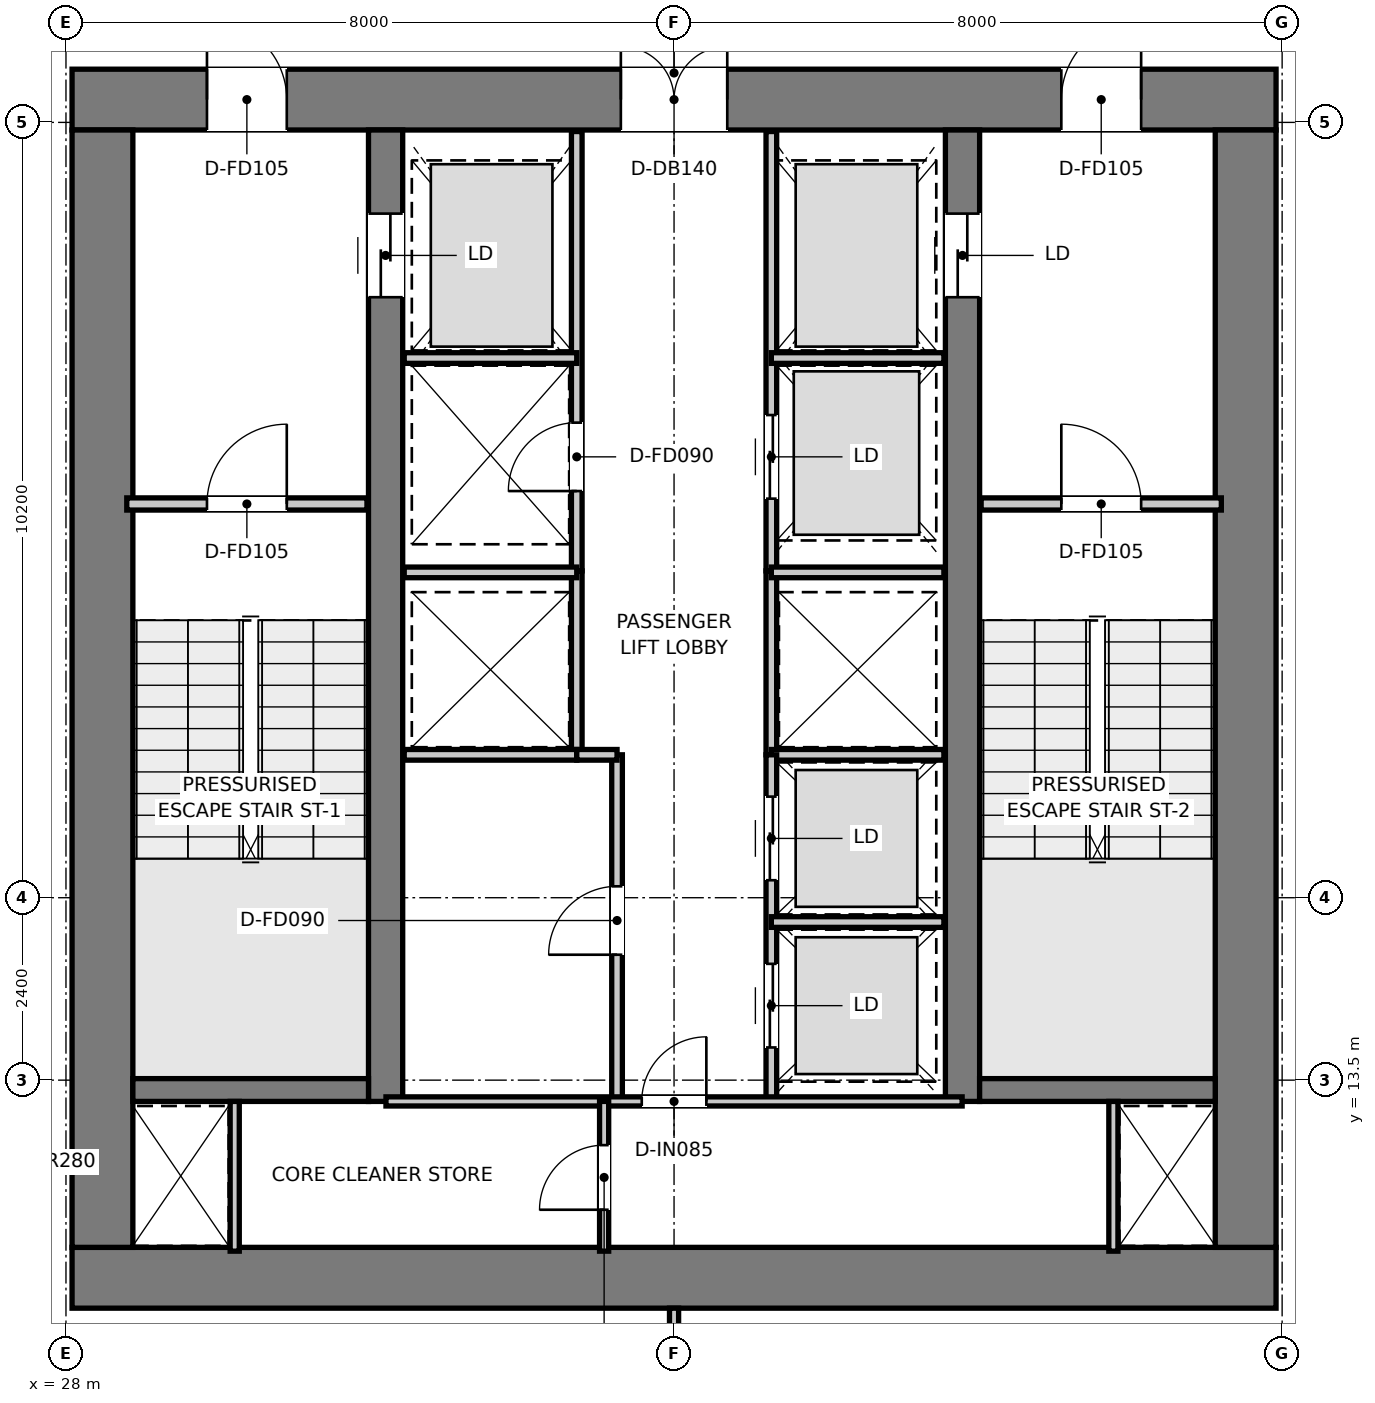
"""IFC4 building model, lengths in metres.
Left out: names, types, materials, properties, quantities, classifications, styles, units other than length and angle.
Written with IfcOpenShell. Run it as: python <this file> out.ifc"""

import sys

from ifc_helpers import new_model, si_unit, direction, frame, frame_2d, origin, place, context, subcontext, project, spatial, rectangle, extrude, element, fill, save


model = new_model("IFC4")
c1 = context("Model", 3, precision=1e-05, world=origin(), true_north=direction((0.0, 1.0)))
c2 = subcontext(c1, "Body", "Model", "MODEL_VIEW")
j1 = project(units=[si_unit("LENGTHUNIT", "METRE"), si_unit("PLANEANGLEUNIT", "RADIAN")], contexts=[c1])
p1 = place(None, origin())
s1 = spatial("IfcSite", under=j1, at=p1, CompositionType="ELEMENT")
p2 = place(p1, origin())
s2 = spatial("IfcBuilding", under=s1, at=p2, CompositionType="ELEMENT")
p3 = place(p2, frame((0.0, 0.0, 162.0)))
s3 = spatial("IfcBuildingStorey", under=s2, at=p3, CompositionType="ELEMENT", Elevation=162.0)
p4 = place(p3, frame((28.08, 10.9, 0.0), z_axis=(0.0, 0.0, 1.0), x_axis=(1.0, 0.0, 0.0)))
e1 = element("IfcWall", 1, at=p4, inside=s3, PredefinedType="SHEAR", context=c2, shape_type="SweptSolid", body=[
    extrude(rectangle(XDim=15.84, YDim=0.8, at=frame_2d((7.92, 0.0))), origin(), (0.0, 0.0, 1.0), 3.95),
])
p5 = place(p3, frame((28.08, 26.4, 0.0), z_axis=(0.0, 0.0, 1.0), x_axis=(1.0, 0.0, 0.0)))
e2 = element("IfcWall", 2, at=p5, inside=s3, PredefinedType="SHEAR", context=c2, shape_type="SweptSolid", body=[
    extrude(rectangle(XDim=15.84, YDim=0.8, at=frame_2d((7.92, 0.0))), origin(), (0.0, 0.0, 1.0), 3.95),
])
p6 = place(p5, frame((7.22, 0.0, 0.0)))
e3 = element("IfcOpeningElement", 3, at=p6, cuts=e2, PredefinedType="OPENING", context=c2, shape_type="SweptSolid", body=[
    extrude(rectangle(XDim=1.4, YDim=2.2, at=frame_2d((0.7, 1.1))), frame((0.0, 0.41, 0.0), z_axis=(0.0, -1.0, 0.0), x_axis=(1.0, 0.0, 0.0)), (0.0, 0.0, 1.0), 0.82),
])
p7 = place(p5, frame((1.775, 0.0, 0.0)))
e4 = element("IfcOpeningElement", 4, at=p7, cuts=e2, PredefinedType="OPENING", context=c2, shape_type="SweptSolid", body=[
    extrude(rectangle(XDim=1.05, YDim=2.1, at=frame_2d((0.525, 1.05))), frame((0.0, 0.41, 0.0), z_axis=(0.0, -1.0, 0.0), x_axis=(1.0, 0.0, 0.0)), (0.0, 0.0, 1.0), 0.82),
])
p8 = place(p5, frame((13.015, 0.0, 0.0)))
e5 = element("IfcOpeningElement", 5, at=p8, cuts=e2, PredefinedType="OPENING", context=c2, shape_type="SweptSolid", body=[
    extrude(rectangle(XDim=1.05, YDim=2.1, at=frame_2d((0.525, 1.05))), frame((0.0, 0.41, 0.0), z_axis=(0.0, -1.0, 0.0), x_axis=(1.0, 0.0, 0.0)), (0.0, 0.0, 1.0), 0.82),
])
for number, where, z_axis, x_axis in (
    (6, (28.48, 11.3, 0.0), (0.0, 0.0, 1.0), (0.0, 1.0, 0.0)),
    (7, (43.52, 11.3, 0.0), (0.0, 0.0, 1.0), (0.0, 1.0, 0.0)),
):
    element("IfcWall", number, at=place(p3, frame(where, z_axis=z_axis, x_axis=x_axis)), inside=s3, PredefinedType="SHEAR", context=c2, shape_type="SweptSolid", body=[
        extrude(rectangle(XDim=14.7, YDim=0.8, at=frame_2d((7.35, 0.0))), origin(), (0.0, 0.0, 1.0), 3.95),
    ])
p9 = place(p3, frame((32.205, 13.22, 0.0), z_axis=(0.0, 0.0, 1.0), x_axis=(0.0, 1.0, 0.0)))
e8 = element("IfcWall", 8, at=p9, inside=s3, PredefinedType="SHEAR", context=c2, shape_type="SweptSolid", body=[
    extrude(rectangle(XDim=12.78, YDim=0.45, at=frame_2d((6.39, 0.0))), origin(), (0.0, 0.0, 1.0), 3.95),
])
p10 = place(p9, frame((10.58, 0.0, 0.0)))
e9 = element("IfcOpeningElement", 9, at=p10, cuts=e8, PredefinedType="OPENING", context=c2, shape_type="SweptSolid", body=[
    extrude(rectangle(XDim=1.1, YDim=2.15, at=frame_2d((0.55, 1.075))), frame((0.0, 0.235, 0.0), z_axis=(0.0, -1.0, 0.0), x_axis=(1.0, 0.0, 0.0)), (0.0, 0.0, 1.0), 0.47),
])
p11 = place(p3, frame((39.795, 13.22, 0.0), z_axis=(0.0, 0.0, 1.0), x_axis=(0.0, 1.0, 0.0)))
e10 = element("IfcWall", 10, at=p11, inside=s3, PredefinedType="SHEAR", context=c2, shape_type="SweptSolid", body=[
    extrude(rectangle(XDim=12.78, YDim=0.45, at=frame_2d((6.39, 0.0))), origin(), (0.0, 0.0, 1.0), 3.95),
])
p12 = place(p11, frame((10.58, 0.0, 0.0)))
e11 = element("IfcOpeningElement", 11, at=p12, cuts=e10, PredefinedType="OPENING", context=c2, shape_type="SweptSolid", body=[
    extrude(rectangle(XDim=1.1, YDim=2.15, at=frame_2d((0.55, 1.075))), frame((0.0, 0.235, 0.0), z_axis=(0.0, -1.0, 0.0), x_axis=(1.0, 0.0, 0.0)), (0.0, 0.0, 1.0), 0.47),
])
for number, where, z_axis, x_axis in (
    (12, (28.88, 13.37, 0.0), (0.0, 0.0, 1.0), (1.0, 0.0, 0.0)),
    (13, (40.02, 13.37, 0.0), (0.0, 0.0, 1.0), (1.0, 0.0, 0.0)),
):
    element("IfcWall", number, at=place(p3, frame(where, z_axis=z_axis, x_axis=x_axis)), inside=s3, PredefinedType="SHEAR", context=c2, shape_type="SweptSolid", body=[
        extrude(rectangle(XDim=3.1, YDim=0.3, at=frame_2d((1.55, 0.0))), origin(), (0.0, 0.0, 1.0), 3.95),
    ])
p13 = place(p3, frame((28.8, 21.08, 0.0), z_axis=(0.0, 0.0, 1.0), x_axis=(1.0, 0.0, 0.0)))
e14 = element("IfcWall", 14, at=p13, inside=s3, PredefinedType="PARTITIONING", context=c2, shape_type="SweptSolid", body=[
    extrude(rectangle(XDim=3.16, YDim=0.16, at=frame_2d((1.58, 0.0))), origin(), (0.0, 0.0, 1.0), 3.67),
])
p14 = place(p13, frame((1.055, 0.0, 0.0)))
e15 = element("IfcOpeningElement", 15, at=p14, cuts=e14, PredefinedType="OPENING", context=c2, shape_type="SweptSolid", body=[
    extrude(rectangle(XDim=1.05, YDim=2.1, at=frame_2d((0.525, 1.05))), frame((0.0, 0.09, 0.0), z_axis=(0.0, -1.0, 0.0), x_axis=(1.0, 0.0, 0.0)), (0.0, 0.0, 1.0), 0.18),
])
p15 = place(p3, frame((40.04, 21.08, 0.0), z_axis=(0.0, 0.0, 1.0), x_axis=(1.0, 0.0, 0.0)))
e16 = element("IfcWall", 16, at=p15, inside=s3, PredefinedType="PARTITIONING", context=c2, shape_type="SweptSolid", body=[
    extrude(rectangle(XDim=3.16, YDim=0.16, at=frame_2d((1.58, 0.0))), origin(), (0.0, 0.0, 1.0), 3.67),
])
p16 = place(p15, frame((1.055, 0.0, 0.0)))
e17 = element("IfcOpeningElement", 17, at=p16, cuts=e16, PredefinedType="OPENING", context=c2, shape_type="SweptSolid", body=[
    extrude(rectangle(XDim=1.05, YDim=2.1, at=frame_2d((0.525, 1.05))), frame((0.0, 0.09, 0.0), z_axis=(0.0, -1.0, 0.0), x_axis=(1.0, 0.0, 0.0)), (0.0, 0.0, 1.0), 0.18),
])
p17 = place(p3, frame((34.72, 20.2, 0.0), z_axis=(0.0, 0.0, 1.0), x_axis=(0.0, 1.0, 0.0)))
e18 = element("IfcWall", 18, at=p17, inside=s3, PredefinedType="PARTITIONING", context=c2, shape_type="SweptSolid", body=[
    extrude(rectangle(XDim=5.78, YDim=0.14, at=frame_2d((2.89, 0.0))), origin(), (0.0, 0.0, 1.0), 2.67),
])
p18 = place(p17, frame((1.05, 0.0, 0.0)))
e19 = element("IfcOpeningElement", 19, at=p18, cuts=e18, PredefinedType="OPENING", context=c2, shape_type="SweptSolid", body=[
    extrude(rectangle(XDim=0.9, YDim=2.1, at=frame_2d((0.45, 1.05))), frame((0.0, 0.08, 0.0), z_axis=(0.0, -1.0, 0.0), x_axis=(1.0, 0.0, 0.0)), (0.0, 0.0, 1.0), 0.16),
])
p19 = place(p3, frame((37.28, 20.2, 0.0), z_axis=(0.0, 0.0, 1.0), x_axis=(0.0, 1.0, 0.0)))
e20 = element("IfcWall", 20, at=p19, inside=s3, PredefinedType="PARTITIONING", context=c2, shape_type="SweptSolid", body=[
    extrude(rectangle(XDim=5.78, YDim=0.14, at=frame_2d((2.89, 0.0))), origin(), (0.0, 0.0, 1.0), 2.67),
])
p20 = place(p19, frame((0.95, 0.0, 0.0)))
e21 = element("IfcOpeningElement", 21, at=p20, cuts=e20, PredefinedType="OPENING", context=c2, shape_type="SweptSolid", body=[
    extrude(rectangle(XDim=1.1, YDim=2.15, at=frame_2d((0.55, 1.075))), frame((0.0, 0.08, 0.0), z_axis=(0.0, -1.0, 0.0), x_axis=(1.0, 0.0, 0.0)), (0.0, 0.0, 1.0), 0.16),
])
for number, where, z_axis, x_axis in (
    (22, (32.45, 23.0, 0.0), (0.0, 0.0, 1.0), (1.0, 0.0, 0.0)),
    (23, (37.28, 23.0, 0.0), (0.0, 0.0, 1.0), (1.0, 0.0, 0.0)),
):
    element("IfcWall", number, at=place(p3, frame(where, z_axis=z_axis, x_axis=x_axis)), inside=s3, PredefinedType="PARTITIONING", context=c2, shape_type="SweptSolid", body=[
        extrude(rectangle(XDim=2.27, YDim=0.14, at=frame_2d((1.135, 0.0))), origin(), (0.0, 0.0, 1.0), 2.67),
    ])
for number, where, z_axis, x_axis in (
    (24, (34.72, 17.78, 0.0), (0.0, 0.0, 1.0), (0.0, 1.0, 0.0)),
    (25, (37.28, 17.78, 0.0), (0.0, 0.0, 1.0), (0.0, 1.0, 0.0)),
):
    element("IfcWall", number, at=place(p3, frame(where, z_axis=z_axis, x_axis=x_axis)), inside=s3, PredefinedType="PARTITIONING", context=c2, shape_type="SweptSolid", body=[
        extrude(rectangle(XDim=2.42, YDim=0.14, at=frame_2d((1.21, 0.0))), origin(), (0.0, 0.0, 1.0), 3.67),
    ])
for number, where, z_axis, x_axis in (
    (26, (32.45, 17.78, 0.0), (0.0, 0.0, 1.0), (1.0, 0.0, 0.0)),
    (27, (32.45, 20.18, 0.0), (0.0, 0.0, 1.0), (1.0, 0.0, 0.0)),
    (28, (37.28, 17.78, 0.0), (0.0, 0.0, 1.0), (1.0, 0.0, 0.0)),
    (29, (37.28, 20.18, 0.0), (0.0, 0.0, 1.0), (1.0, 0.0, 0.0)),
):
    element("IfcWall", number, at=place(p3, frame(where, z_axis=z_axis, x_axis=x_axis)), inside=s3, PredefinedType="PARTITIONING", context=c2, shape_type="SweptSolid", body=[
        extrude(rectangle(XDim=2.27, YDim=0.14, at=frame_2d((1.135, 0.0))), origin(), (0.0, 0.0, 1.0), 3.67),
    ])
p21 = place(p3, frame((35.25, 13.22, 0.0), z_axis=(0.0, 0.0, 1.0), x_axis=(0.0, 1.0, 0.0)))
e30 = element("IfcWall", 30, at=p21, inside=s3, PredefinedType="PARTITIONING", context=c2, shape_type="SweptSolid", body=[
    extrude(rectangle(XDim=4.56, YDim=0.14, at=frame_2d((2.28, 0.0))), origin(), (0.0, 0.0, 1.0), 3.67),
])
p22 = place(p21, frame((1.93, 0.0, 0.0)))
e31 = element("IfcOpeningElement", 31, at=p22, cuts=e30, PredefinedType="OPENING", context=c2, shape_type="SweptSolid", body=[
    extrude(rectangle(XDim=0.9, YDim=2.1, at=frame_2d((0.45, 1.05))), frame((0.0, 0.08, 0.0), z_axis=(0.0, -1.0, 0.0), x_axis=(1.0, 0.0, 0.0)), (0.0, 0.0, 1.0), 0.16),
])
p23 = place(p3, frame((34.72, 17.78, 0.0), z_axis=(0.0, 0.0, 1.0), x_axis=(1.0, 0.0, 0.0)))
e32 = element("IfcWall", 32, at=p23, inside=s3, PredefinedType="PARTITIONING", context=c2, shape_type="SweptSolid", body=[
    extrude(rectangle(XDim=0.53, YDim=0.14, at=frame_2d((0.265, 0.0))), origin(), (0.0, 0.0, 1.0), 3.67),
])
p24 = place(p3, frame((37.28, 13.22, 0.0), z_axis=(0.0, 0.0, 1.0), x_axis=(0.0, 1.0, 0.0)))
e33 = element("IfcWall", 33, at=p24, inside=s3, PredefinedType="PARTITIONING", context=c2, shape_type="SweptSolid", body=[
    extrude(rectangle(XDim=4.56, YDim=0.14, at=frame_2d((2.28, 0.0))), origin(), (0.0, 0.0, 1.0), 3.67),
])
p25 = place(p24, frame((0.71, 0.0, 0.0)))
e34 = element("IfcOpeningElement", 34, at=p25, cuts=e33, PredefinedType="OPENING", context=c2, shape_type="SweptSolid", body=[
    extrude(rectangle(XDim=1.1, YDim=2.15, at=frame_2d((0.55, 1.075))), frame((0.0, 0.08, 0.0), z_axis=(0.0, -1.0, 0.0), x_axis=(1.0, 0.0, 0.0)), (0.0, 0.0, 1.0), 0.16),
])
p26 = place(p24, frame((2.91, 0.0, 0.0)))
e35 = element("IfcOpeningElement", 35, at=p26, cuts=e33, PredefinedType="OPENING", context=c2, shape_type="SweptSolid", body=[
    extrude(rectangle(XDim=1.1, YDim=2.15, at=frame_2d((0.55, 1.075))), frame((0.0, 0.08, 0.0), z_axis=(0.0, -1.0, 0.0), x_axis=(1.0, 0.0, 0.0)), (0.0, 0.0, 1.0), 0.16),
])
p27 = place(p3, frame((37.28, 15.58, 0.0), z_axis=(0.0, 0.0, 1.0), x_axis=(1.0, 0.0, 0.0)))
e36 = element("IfcWall", 36, at=p27, inside=s3, PredefinedType="PARTITIONING", context=c2, shape_type="SweptSolid", body=[
    extrude(rectangle(XDim=2.27, YDim=0.14, at=frame_2d((1.135, 0.0))), origin(), (0.0, 0.0, 1.0), 3.67),
])
for number, where, z_axis, x_axis in (
    (37, (30.22, 11.25, 0.0), (0.0, 0.0, 1.0), (0.0, 1.0, 0.0)),
    (38, (41.78, 11.25, 0.0), (0.0, 0.0, 1.0), (0.0, 1.0, 0.0)),
):
    element("IfcWall", number, at=place(p3, frame(where, z_axis=z_axis, x_axis=x_axis)), inside=s3, PredefinedType="PARTITIONING", context=c2, shape_type="SweptSolid", body=[
        extrude(rectangle(XDim=1.97, YDim=0.12, at=frame_2d((0.985, 0.0))), origin(), (0.0, 0.0, 1.0), 3.67),
    ])
p28 = place(p3, frame((32.21, 13.22, 0.0), z_axis=(0.0, 0.0, 1.0), x_axis=(1.0, 0.0, 0.0)))
e39 = element("IfcWall", 39, at=p28, inside=s3, PredefinedType="PARTITIONING", context=c2, shape_type="SweptSolid", body=[
    extrude(rectangle(XDim=7.58, YDim=0.12, at=frame_2d((3.79, 0.0))), origin(), (0.0, 0.0, 1.0), 3.67),
])
p29 = place(p28, frame((3.365, 0.0, 0.0)))
e40 = element("IfcOpeningElement", 40, at=p29, cuts=e39, PredefinedType="OPENING", context=c2, shape_type="SweptSolid", body=[
    extrude(rectangle(XDim=0.85, YDim=2.1, at=frame_2d((0.425, 1.05))), frame((0.0, 0.07, 0.0), z_axis=(0.0, -1.0, 0.0), x_axis=(1.0, 0.0, 0.0)), (0.0, 0.0, 1.0), 0.14),
])
p30 = place(p3, frame((35.08, 11.25, 0.0), z_axis=(0.0, 0.0, 1.0), x_axis=(0.0, 1.0, 0.0)))
e41 = element("IfcWall", 41, at=p30, inside=s3, PredefinedType="PARTITIONING", context=c2, shape_type="SweptSolid", body=[
    extrude(rectangle(XDim=1.97, YDim=0.12, at=frame_2d((0.985, 0.0))), origin(), (0.0, 0.0, 1.0), 3.67),
])
p31 = place(p30, frame((0.545, 0.0, 0.0)))
e42 = element("IfcOpeningElement", 42, at=p31, cuts=e41, PredefinedType="OPENING", context=c2, shape_type="SweptSolid", body=[
    extrude(rectangle(XDim=0.85, YDim=2.1, at=frame_2d((0.425, 1.05))), frame((0.0, 0.07, 0.0), z_axis=(0.0, -1.0, 0.0), x_axis=(1.0, 0.0, 0.0)), (0.0, 0.0, 1.0), 0.14),
])
p32 = place(p3, frame((36.0, 1.579, 0.0), z_axis=(0.0, 0.0, 1.0), x_axis=(0.0, 1.0, 0.0)))
e43 = element("IfcWall", 43, at=p32, inside=s3, PredefinedType="PARTITIONING", context=c2, shape_type="SweptSolid", body=[
    extrude(rectangle(XDim=8.921, YDim=0.12, at=frame_2d((4.46, 0.0))), origin(), (0.0, 0.0, 1.0), 3.67),
])
p33 = place(p14, origin())
e44 = element("IfcDoor", 44, at=p33, inside=s3, OperationType="SINGLE_SWING_RIGHT", PredefinedType="DOOR", context=c2, shape_type="SweptSolid", body=[
    extrude(rectangle(XDim=1.05, YDim=2.1, at=frame_2d((0.525, 1.05))), frame((0.0, 0.025, 0.0), z_axis=(0.0, -1.0, 0.0), x_axis=(1.0, 0.0, 0.0)), (0.0, 0.0, 1.0), 0.05),
])
fill(e15, e44)
p34 = place(p16, origin())
e45 = element("IfcDoor", 45, at=p34, inside=s3, OperationType="SINGLE_SWING_LEFT", PredefinedType="DOOR", context=c2, shape_type="SweptSolid", body=[
    extrude(rectangle(XDim=1.05, YDim=2.1, at=frame_2d((0.525, 1.05))), frame((0.0, 0.025, 0.0), z_axis=(0.0, -1.0, 0.0), x_axis=(1.0, 0.0, 0.0)), (0.0, 0.0, 1.0), 0.05),
])
fill(e17, e45)
p35 = place(p6, origin())
e46 = element("IfcDoor", 46, at=p35, inside=s3, OperationType="DOUBLE_DOOR_SINGLE_SWING", PredefinedType="DOOR", context=c2, shape_type="SweptSolid", body=[
    extrude(rectangle(XDim=1.4, YDim=2.2, at=frame_2d((0.7, 1.1))), frame((0.0, 0.025, 0.0), z_axis=(0.0, -1.0, 0.0), x_axis=(1.0, 0.0, 0.0)), (0.0, 0.0, 1.0), 0.05),
])
fill(e3, e46)
p36 = place(p7, origin())
e47 = element("IfcDoor", 47, at=p36, inside=s3, OperationType="SINGLE_SWING_LEFT", PredefinedType="DOOR", context=c2, shape_type="SweptSolid", body=[
    extrude(rectangle(XDim=1.05, YDim=2.1, at=frame_2d((0.525, 1.05))), frame((0.0, 0.025, 0.0), z_axis=(0.0, -1.0, 0.0), x_axis=(1.0, 0.0, 0.0)), (0.0, 0.0, 1.0), 0.05),
])
fill(e4, e47)
p37 = place(p8, origin())
e48 = element("IfcDoor", 48, at=p37, inside=s3, OperationType="SINGLE_SWING_RIGHT", PredefinedType="DOOR", context=c2, shape_type="SweptSolid", body=[
    extrude(rectangle(XDim=1.05, YDim=2.1, at=frame_2d((0.525, 1.05))), frame((0.0, 0.025, 0.0), z_axis=(0.0, -1.0, 0.0), x_axis=(1.0, 0.0, 0.0)), (0.0, 0.0, 1.0), 0.05),
])
fill(e5, e48)
p38 = place(p10, origin())
e49 = element("IfcDoor", 49, at=p38, inside=s3, OperationType="DOUBLE_DOOR_SLIDING", PredefinedType="DOOR", context=c2, shape_type="SweptSolid", body=[
    extrude(rectangle(XDim=1.1, YDim=2.15, at=frame_2d((0.55, 1.075))), frame((0.0, 0.025, 0.0), z_axis=(0.0, -1.0, 0.0), x_axis=(1.0, 0.0, 0.0)), (0.0, 0.0, 1.0), 0.05),
])
fill(e9, e49)
p39 = place(p12, origin())
e50 = element("IfcDoor", 50, at=p39, inside=s3, OperationType="DOUBLE_DOOR_SLIDING", PredefinedType="DOOR", context=c2, shape_type="SweptSolid", body=[
    extrude(rectangle(XDim=1.1, YDim=2.15, at=frame_2d((0.55, 1.075))), frame((0.0, 0.025, 0.0), z_axis=(0.0, -1.0, 0.0), x_axis=(1.0, 0.0, 0.0)), (0.0, 0.0, 1.0), 0.05),
])
fill(e11, e50)
p40 = place(p18, origin())
e51 = element("IfcDoor", 51, at=p40, inside=s3, OperationType="SINGLE_SWING_LEFT", PredefinedType="DOOR", context=c2, shape_type="SweptSolid", body=[
    extrude(rectangle(XDim=0.9, YDim=2.1, at=frame_2d((0.45, 1.05))), frame((0.0, 0.025, 0.0), z_axis=(0.0, -1.0, 0.0), x_axis=(1.0, 0.0, 0.0)), (0.0, 0.0, 1.0), 0.05),
])
fill(e19, e51)
p41 = place(p20, origin())
e52 = element("IfcDoor", 52, at=p41, inside=s3, OperationType="DOUBLE_DOOR_SLIDING", PredefinedType="DOOR", context=c2, shape_type="SweptSolid", body=[
    extrude(rectangle(XDim=1.1, YDim=2.15, at=frame_2d((0.55, 1.075))), frame((0.0, 0.025, 0.0), z_axis=(0.0, -1.0, 0.0), x_axis=(1.0, 0.0, 0.0)), (0.0, 0.0, 1.0), 0.05),
])
fill(e21, e52)
p42 = place(p22, origin())
e53 = element("IfcDoor", 53, at=p42, inside=s3, OperationType="SINGLE_SWING_LEFT", PredefinedType="DOOR", context=c2, shape_type="SweptSolid", body=[
    extrude(rectangle(XDim=0.9, YDim=2.1, at=frame_2d((0.45, 1.05))), frame((0.0, 0.025, 0.0), z_axis=(0.0, -1.0, 0.0), x_axis=(1.0, 0.0, 0.0)), (0.0, 0.0, 1.0), 0.05),
])
fill(e31, e53)
p43 = place(p25, origin())
e54 = element("IfcDoor", 54, at=p43, inside=s3, OperationType="DOUBLE_DOOR_SLIDING", PredefinedType="DOOR", context=c2, shape_type="SweptSolid", body=[
    extrude(rectangle(XDim=1.1, YDim=2.15, at=frame_2d((0.55, 1.075))), frame((0.0, 0.025, 0.0), z_axis=(0.0, -1.0, 0.0), x_axis=(1.0, 0.0, 0.0)), (0.0, 0.0, 1.0), 0.05),
])
fill(e34, e54)
p44 = place(p26, origin())
e55 = element("IfcDoor", 55, at=p44, inside=s3, OperationType="DOUBLE_DOOR_SLIDING", PredefinedType="DOOR", context=c2, shape_type="SweptSolid", body=[
    extrude(rectangle(XDim=1.1, YDim=2.15, at=frame_2d((0.55, 1.075))), frame((0.0, 0.025, 0.0), z_axis=(0.0, -1.0, 0.0), x_axis=(1.0, 0.0, 0.0)), (0.0, 0.0, 1.0), 0.05),
])
fill(e35, e55)
p45 = place(p29, origin())
e56 = element("IfcDoor", 56, at=p45, inside=s3, OperationType="SINGLE_SWING_RIGHT", PredefinedType="DOOR", context=c2, shape_type="SweptSolid", body=[
    extrude(rectangle(XDim=0.85, YDim=2.1, at=frame_2d((0.425, 1.05))), frame((0.0, 0.025, 0.0), z_axis=(0.0, -1.0, 0.0), x_axis=(1.0, 0.0, 0.0)), (0.0, 0.0, 1.0), 0.05),
])
fill(e40, e56)
p46 = place(p31, origin())
e57 = element("IfcDoor", 57, at=p46, inside=s3, OperationType="SINGLE_SWING_LEFT", PredefinedType="DOOR", context=c2, shape_type="SweptSolid", body=[
    extrude(rectangle(XDim=0.85, YDim=2.1, at=frame_2d((0.425, 1.05))), frame((0.0, 0.025, 0.0), z_axis=(0.0, -1.0, 0.0), x_axis=(1.0, 0.0, 0.0)), (0.0, 0.0, 1.0), 0.05),
])
fill(e42, e57)
save(model, sys.argv[1])
